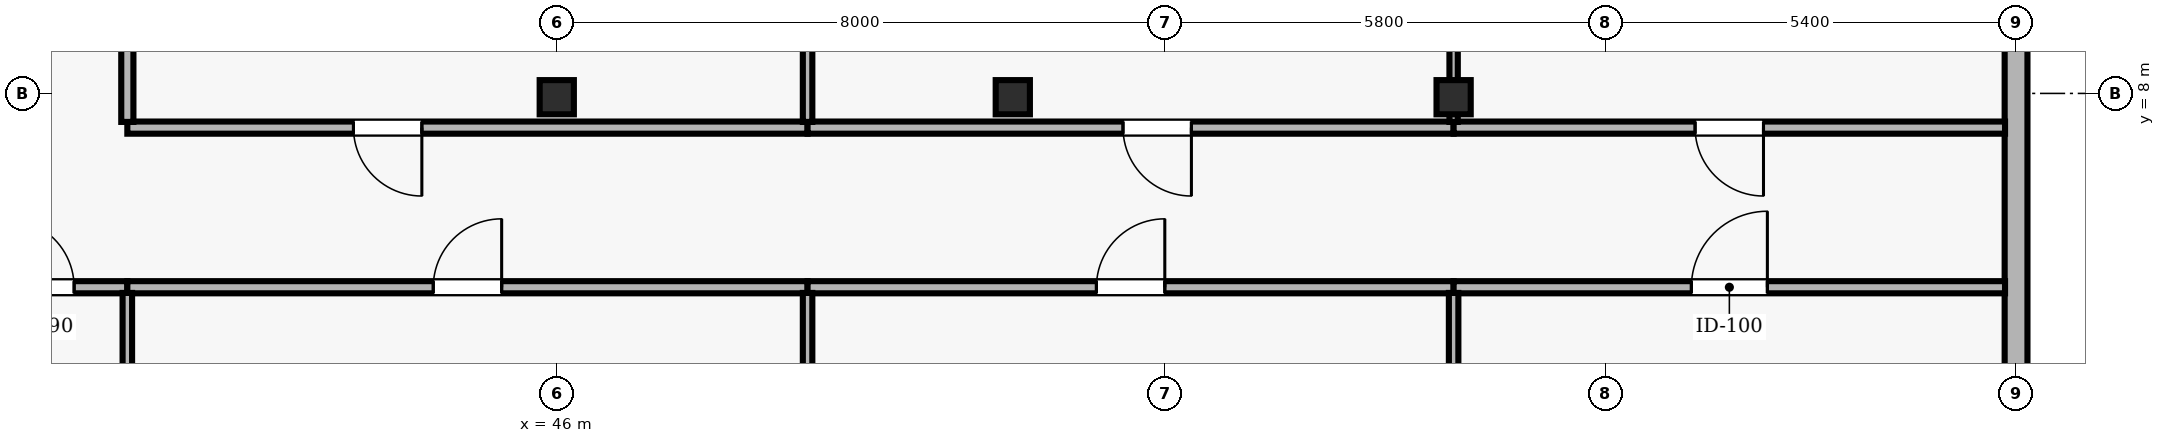
"""IFC4 building model, lengths in metres.
Left out: names, types, materials, properties, quantities, classifications, styles, units other than length and angle.
Written with IfcOpenShell. Run it as: python <this file> out.ifc"""

import sys

from ifc_helpers import new_model, si_unit, direction, frame, frame_2d, origin, origin_2d, place, context, subcontext, project, spatial, rectangle, hollow_rectangle, extrude, element, fill, save


model = new_model("IFC4")
c1 = context("Model", 3, precision=1e-05, world=origin(), true_north=direction((0.0, 1.0)))
c2 = subcontext(c1, "Body", "Model", "MODEL_VIEW")
j1 = project(units=[si_unit("LENGTHUNIT", "METRE"), si_unit("PLANEANGLEUNIT", "RADIAN")], contexts=[c1])
p1 = place(None, origin())
s1 = spatial("IfcSite", under=j1, at=p1, CompositionType="ELEMENT")
p2 = place(p1, origin())
s2 = spatial("IfcBuilding", under=s1, at=p2, CompositionType="ELEMENT")
p3 = place(p2, frame((0.0, 0.0, 218.7)))
s3 = spatial("IfcBuildingStorey", under=s2, at=p3, CompositionType="ELEMENT", Elevation=218.7)
for number, where, z_axis, x_axis in (
    (1, (46.0, 7.95, 0.0), (0.0, 0.0, 1.0), (1.0, 0.0, 0.0)),
    (2, (52.0, 7.95, 0.0), (0.0, 0.0, 1.0), (1.0, 0.0, 0.0)),
    (3, (57.8, 7.95, 0.0), (0.0, 0.0, 1.0), (1.0, 0.0, 0.0)),
):
    element("IfcColumn", number, at=place(p3, frame(where, z_axis=z_axis, x_axis=x_axis)), inside=s3, PredefinedType="COLUMN", context=c2, shape_type="SweptSolid", body=[
        extrude(hollow_rectangle(XDim=0.45, YDim=0.45, WallThickness=0.02, at=origin_2d()), origin(), (0.0, 0.0, 1.0), 3.9),
    ])
p4 = place(p3, frame((65.2, 2.5, 0.0), z_axis=(0.0, 0.0, 1.0), x_axis=(0.0, 1.0, 0.0)))
e4 = element("IfcWall", 4, at=p4, inside=s3, PredefinedType="SOLIDWALL", context=c2, shape_type="SweptSolid", body=[
    extrude(rectangle(XDim=11.0, YDim=0.3, at=frame_2d((5.5, 0.0))), origin(), (0.0, 0.0, 1.0), 3.69),
])
p5 = place(p4, frame((7.05, 0.0, 0.9)))
e5 = element("IfcOpeningElement", 5, at=p5, cuts=e4, PredefinedType="OPENING", context=c2, shape_type="SweptSolid", body=[
    extrude(rectangle(XDim=2.4, YDim=1.8, at=frame_2d((1.2, 0.9))), frame((0.0, 0.16, 0.0), z_axis=(0.0, -1.0, 0.0), x_axis=(1.0, 0.0, 0.0)), (0.0, 0.0, 1.0), 0.32),
])
p6 = place(p3, frame((38.05, 5.45, 0.0), z_axis=(0.0, 0.0, 1.0), x_axis=(1.0, 0.0, 0.0)))
e6 = element("IfcWall", 6, at=p6, inside=s3, PredefinedType="PARTITIONING", context=c2, shape_type="SweptSolid", body=[
    extrude(rectangle(XDim=2.3, YDim=0.16, at=frame_2d((1.15, 0.0))), origin(), (0.0, 0.0, 1.0), 3.372),
])
p7 = place(p6, frame((0.7, 0.0, 0.0)))
e7 = element("IfcOpeningElement", 7, at=p7, cuts=e6, PredefinedType="OPENING", context=c2, shape_type="SweptSolid", body=[
    extrude(rectangle(XDim=0.9, YDim=2.1, at=frame_2d((0.45, 1.05))), frame((0.0, 0.09, 0.0), z_axis=(0.0, -1.0, 0.0), x_axis=(1.0, 0.0, 0.0)), (0.0, 0.0, 1.0), 0.18),
])
p8 = place(p3, frame((40.35, 5.45, 0.0), z_axis=(0.0, 0.0, 1.0), x_axis=(1.0, 0.0, 0.0)))
e8 = element("IfcWall", 8, at=p8, inside=s3, PredefinedType="PARTITIONING", context=c2, shape_type="SweptSolid", body=[
    extrude(rectangle(XDim=8.95, YDim=0.16, at=frame_2d((4.475, 0.0))), origin(), (0.0, 0.0, 1.0), 3.372),
])
p9 = place(p8, frame((4.025, 0.0, 0.0)))
e9 = element("IfcOpeningElement", 9, at=p9, cuts=e8, PredefinedType="OPENING", context=c2, shape_type="SweptSolid", body=[
    extrude(rectangle(XDim=0.9, YDim=2.1, at=frame_2d((0.45, 1.05))), frame((0.0, 0.09, 0.0), z_axis=(0.0, -1.0, 0.0), x_axis=(1.0, 0.0, 0.0)), (0.0, 0.0, 1.0), 0.18),
])
p10 = place(p3, frame((49.3, 5.45, 0.0), z_axis=(0.0, 0.0, 1.0), x_axis=(1.0, 0.0, 0.0)))
e10 = element("IfcWall", 10, at=p10, inside=s3, PredefinedType="PARTITIONING", context=c2, shape_type="SweptSolid", body=[
    extrude(rectangle(XDim=8.5, YDim=0.16, at=frame_2d((4.25, 0.0))), origin(), (0.0, 0.0, 1.0), 3.372),
])
p11 = place(p10, frame((3.8, 0.0, 0.0)))
e11 = element("IfcOpeningElement", 11, at=p11, cuts=e10, PredefinedType="OPENING", context=c2, shape_type="SweptSolid", body=[
    extrude(rectangle(XDim=0.9, YDim=2.1, at=frame_2d((0.45, 1.05))), frame((0.0, 0.09, 0.0), z_axis=(0.0, -1.0, 0.0), x_axis=(1.0, 0.0, 0.0)), (0.0, 0.0, 1.0), 0.18),
])
p12 = place(p3, frame((49.3, 7.55, 0.0), z_axis=(0.0, 0.0, 1.0), x_axis=(-1.0, 0.0, 0.0)))
e12 = element("IfcWall", 12, at=p12, inside=s3, PredefinedType="PARTITIONING", context=c2, shape_type="SweptSolid", body=[
    extrude(rectangle(XDim=8.95, YDim=0.16, at=frame_2d((4.475, 0.0))), origin(), (0.0, 0.0, 1.0), 3.146),
])
p13 = place(p12, frame((5.075, 0.0, 0.0)))
e13 = element("IfcOpeningElement", 13, at=p13, cuts=e12, PredefinedType="OPENING", context=c2, shape_type="SweptSolid", body=[
    extrude(rectangle(XDim=0.9, YDim=2.1, at=frame_2d((0.45, 1.05))), frame((0.0, 0.09, 0.0), z_axis=(0.0, -1.0, 0.0), x_axis=(1.0, 0.0, 0.0)), (0.0, 0.0, 1.0), 0.18),
])
p14 = place(p3, frame((57.8, 5.45, 0.0), z_axis=(0.0, 0.0, 1.0), x_axis=(1.0, 0.0, 0.0)))
e14 = element("IfcWall", 14, at=p14, inside=s3, PredefinedType="PARTITIONING", context=c2, shape_type="SweptSolid", body=[
    extrude(rectangle(XDim=7.255, YDim=0.16, at=frame_2d((3.627, 0.0))), origin(), (0.0, 0.0, 1.0), 3.69),
])
p15 = place(p14, frame((3.128, 0.0, 0.0)))
e15 = element("IfcOpeningElement", 15, at=p15, cuts=e14, PredefinedType="OPENING", context=c2, shape_type="SweptSolid", body=[
    extrude(rectangle(XDim=1.0, YDim=2.1, at=frame_2d((0.5, 1.05))), frame((0.0, 0.09, 0.0), z_axis=(0.0, -1.0, 0.0), x_axis=(1.0, 0.0, 0.0)), (0.0, 0.0, 1.0), 0.18),
])
p16 = place(p3, frame((57.8, 7.55, 0.0), z_axis=(0.0, 0.0, 1.0), x_axis=(-1.0, 0.0, 0.0)))
e16 = element("IfcWall", 16, at=p16, inside=s3, PredefinedType="PARTITIONING", context=c2, shape_type="SweptSolid", body=[
    extrude(rectangle(XDim=8.5, YDim=0.16, at=frame_2d((4.25, 0.0))), origin(), (0.0, 0.0, 1.0), 3.146),
])
p17 = place(p16, frame((3.45, 0.0, 0.0)))
e17 = element("IfcOpeningElement", 17, at=p17, cuts=e16, PredefinedType="OPENING", context=c2, shape_type="SweptSolid", body=[
    extrude(rectangle(XDim=0.9, YDim=2.1, at=frame_2d((0.45, 1.05))), frame((0.0, 0.09, 0.0), z_axis=(0.0, -1.0, 0.0), x_axis=(1.0, 0.0, 0.0)), (0.0, 0.0, 1.0), 0.18),
])
p18 = place(p3, frame((65.055, 7.55, 0.0), z_axis=(0.0, 0.0, 1.0), x_axis=(-1.0, 0.0, 0.0)))
e18 = element("IfcWall", 18, at=p18, inside=s3, PredefinedType="PARTITIONING", context=c2, shape_type="SweptSolid", body=[
    extrude(rectangle(XDim=7.255, YDim=0.16, at=frame_2d((3.627, 0.0))), origin(), (0.0, 0.0, 1.0), 3.69),
])
p19 = place(p18, frame((3.178, 0.0, 0.0)))
e19 = element("IfcOpeningElement", 19, at=p19, cuts=e18, PredefinedType="OPENING", context=c2, shape_type="SweptSolid", body=[
    extrude(rectangle(XDim=0.9, YDim=2.1, at=frame_2d((0.45, 1.05))), frame((0.0, 0.09, 0.0), z_axis=(0.0, -1.0, 0.0), x_axis=(1.0, 0.0, 0.0)), (0.0, 0.0, 1.0), 0.18),
])
p20 = place(p3, frame((40.35, 0.145, 0.0), z_axis=(0.0, 0.0, 1.0), x_axis=(0.0, 1.0, 0.0)))
e20 = element("IfcWall", 20, at=p20, inside=s3, PredefinedType="PARTITIONING", context=c2, shape_type="SweptSolid", body=[
    extrude(rectangle(XDim=5.23, YDim=0.125, at=frame_2d((2.615, 0.0))), origin(), (0.0, 0.0, 1.0), 3.69),
])
p21 = place(p3, frame((40.35, 7.625, 0.0), z_axis=(0.0, 0.0, 1.0), x_axis=(0.0, 1.0, 0.0)))
e21 = element("IfcWall", 21, at=p21, inside=s3, PredefinedType="PARTITIONING", context=c2, shape_type="SweptSolid", body=[
    extrude(rectangle(XDim=8.3, YDim=0.16, at=frame_2d((4.15, 0.0))), origin(), (0.0, 0.0, 1.0), 3.69),
])
p22 = place(p3, frame((49.3, 0.145, 0.0), z_axis=(0.0, 0.0, 1.0), x_axis=(0.0, 1.0, 0.0)))
e22 = element("IfcWall", 22, at=p22, inside=s3, PredefinedType="PARTITIONING", context=c2, shape_type="SweptSolid", body=[
    extrude(rectangle(XDim=5.23, YDim=0.125, at=frame_2d((2.615, 0.0))), origin(), (0.0, 0.0, 1.0), 3.69),
])
p23 = place(p3, frame((49.3, 7.625, 0.0), z_axis=(0.0, 0.0, 1.0), x_axis=(0.0, 1.0, 0.0)))
e23 = element("IfcWall", 23, at=p23, inside=s3, PredefinedType="PARTITIONING", context=c2, shape_type="SweptSolid", body=[
    extrude(rectangle(XDim=8.23, YDim=0.125, at=frame_2d((4.115, 0.0))), origin(), (0.0, 0.0, 1.0), 3.69),
])
p24 = place(p3, frame((57.8, 0.145, 0.0), z_axis=(0.0, 0.0, 1.0), x_axis=(0.0, 1.0, 0.0)))
e24 = element("IfcWall", 24, at=p24, inside=s3, PredefinedType="PARTITIONING", context=c2, shape_type="SweptSolid", body=[
    extrude(rectangle(XDim=5.23, YDim=0.125, at=frame_2d((2.615, 0.0))), origin(), (0.0, 0.0, 1.0), 3.146),
])
p25 = place(p3, frame((57.8, 7.625, 0.0), z_axis=(0.0, 0.0, 1.0), x_axis=(0.0, 1.0, 0.0)))
e25 = element("IfcWall", 25, at=p25, inside=s3, PredefinedType="MOVABLE", context=c2, shape_type="SweptSolid", body=[
    extrude(rectangle(XDim=8.23, YDim=0.11, at=frame_2d((4.115, 0.0))), origin(), (0.0, 0.0, 1.0), 3.146),
])
p26 = place(p7, origin())
e26 = element("IfcDoor", 26, at=p26, inside=s3, OperationType="SINGLE_SWING_LEFT", PredefinedType="DOOR", context=c2, shape_type="SweptSolid", body=[
    extrude(rectangle(XDim=0.9, YDim=2.1, at=frame_2d((0.45, 1.05))), frame((0.0, 0.025, 0.0), z_axis=(0.0, -1.0, 0.0), x_axis=(1.0, 0.0, 0.0)), (0.0, 0.0, 1.0), 0.05),
])
fill(e7, e26)
p27 = place(p9, origin())
e27 = element("IfcDoor", 27, at=p27, inside=s3, OperationType="SINGLE_SWING_RIGHT", PredefinedType="DOOR", context=c2, shape_type="SweptSolid", body=[
    extrude(rectangle(XDim=0.9, YDim=2.1, at=frame_2d((0.45, 1.05))), frame((0.0, 0.025, 0.0), z_axis=(0.0, -1.0, 0.0), x_axis=(1.0, 0.0, 0.0)), (0.0, 0.0, 1.0), 0.05),
])
fill(e9, e27)
p28 = place(p13, origin())
e28 = element("IfcDoor", 28, at=p28, inside=s3, OperationType="SINGLE_SWING_LEFT", PredefinedType="DOOR", context=c2, shape_type="SweptSolid", body=[
    extrude(rectangle(XDim=0.9, YDim=2.1, at=frame_2d((0.45, 1.05))), frame((0.0, 0.025, 0.0), z_axis=(0.0, -1.0, 0.0), x_axis=(1.0, 0.0, 0.0)), (0.0, 0.0, 1.0), 0.05),
])
fill(e13, e28)
p29 = place(p11, origin())
e29 = element("IfcDoor", 29, at=p29, inside=s3, OperationType="SINGLE_SWING_RIGHT", PredefinedType="DOOR", context=c2, shape_type="SweptSolid", body=[
    extrude(rectangle(XDim=0.9, YDim=2.1, at=frame_2d((0.45, 1.05))), frame((0.0, 0.025, 0.0), z_axis=(0.0, -1.0, 0.0), x_axis=(1.0, 0.0, 0.0)), (0.0, 0.0, 1.0), 0.05),
])
fill(e11, e29)
p30 = place(p17, origin())
e30 = element("IfcDoor", 30, at=p30, inside=s3, OperationType="SINGLE_SWING_LEFT", PredefinedType="DOOR", context=c2, shape_type="SweptSolid", body=[
    extrude(rectangle(XDim=0.9, YDim=2.1, at=frame_2d((0.45, 1.05))), frame((0.0, 0.025, 0.0), z_axis=(0.0, -1.0, 0.0), x_axis=(1.0, 0.0, 0.0)), (0.0, 0.0, 1.0), 0.05),
])
fill(e17, e30)
p31 = place(p15, origin())
e31 = element("IfcDoor", 31, at=p31, inside=s3, OperationType="SINGLE_SWING_RIGHT", PredefinedType="DOOR", context=c2, shape_type="SweptSolid", body=[
    extrude(rectangle(XDim=1.0, YDim=2.1, at=frame_2d((0.5, 1.05))), frame((0.0, 0.025, 0.0), z_axis=(0.0, -1.0, 0.0), x_axis=(1.0, 0.0, 0.0)), (0.0, 0.0, 1.0), 0.05),
])
fill(e15, e31)
p32 = place(p19, origin())
e32 = element("IfcDoor", 32, at=p32, inside=s3, OperationType="SINGLE_SWING_LEFT", PredefinedType="DOOR", context=c2, shape_type="SweptSolid", body=[
    extrude(rectangle(XDim=0.9, YDim=2.1, at=frame_2d((0.45, 1.05))), frame((0.0, 0.025, 0.0), z_axis=(0.0, -1.0, 0.0), x_axis=(1.0, 0.0, 0.0)), (0.0, 0.0, 1.0), 0.05),
])
fill(e19, e32)
save(model, sys.argv[1])
